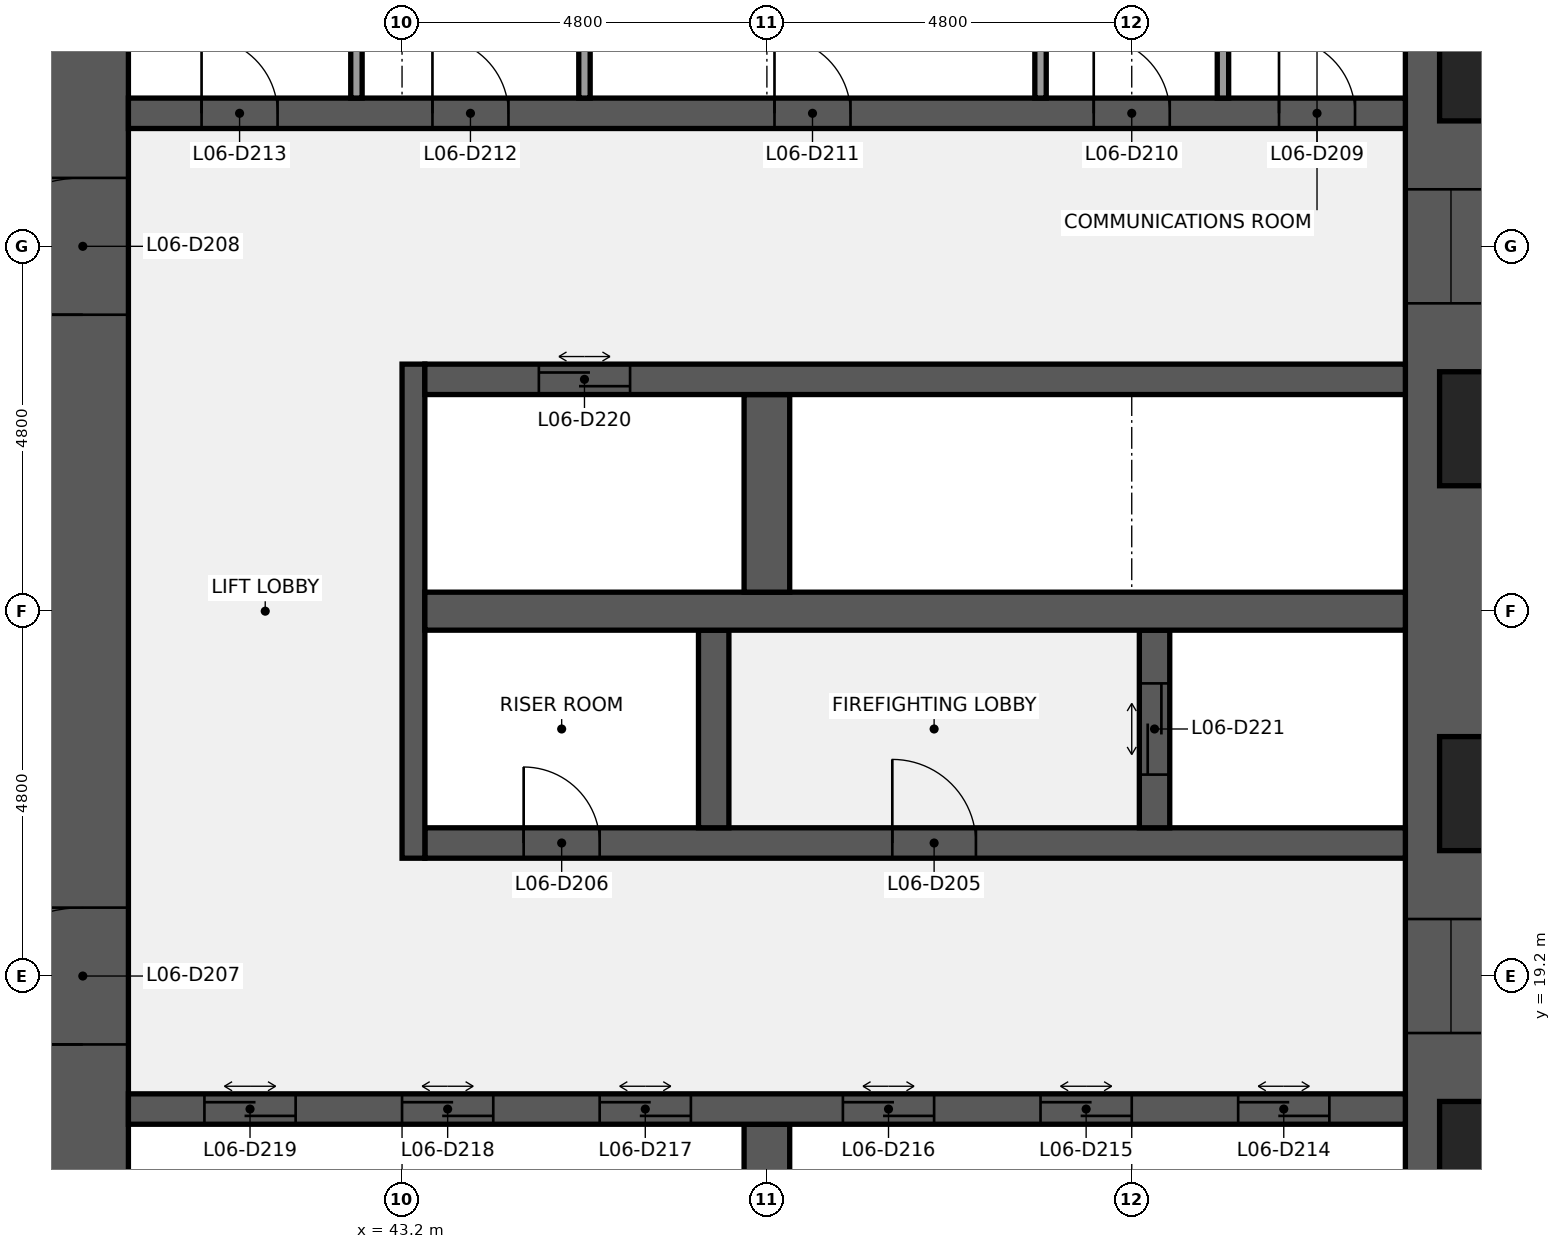
"""IFC4 building model, lengths in metres.
Left out: names, types, materials, properties, quantities, classifications, styles, units other than length and angle.
Written with IfcOpenShell. Run it as: python <this file> out.ifc"""

import sys

from ifc_helpers import new_model, si_unit, direction, frame, frame_2d, origin, place, context, subcontext, project, spatial, rectangle, extrude, element, fill, save


model = new_model("IFC4")
c1 = context("Model", 3, precision=1e-05, world=origin(), true_north=direction((0.0, 1.0)))
c2 = subcontext(c1, "Body", "Model", "MODEL_VIEW")
j1 = project(units=[si_unit("LENGTHUNIT", "METRE"), si_unit("PLANEANGLEUNIT", "RADIAN")], contexts=[c1])
p1 = place(None, origin())
s1 = spatial("IfcSite", under=j1, at=p1, CompositionType="ELEMENT")
p2 = place(p1, origin())
s2 = spatial("IfcBuilding", under=s1, at=p2, CompositionType="ELEMENT")
p3 = place(p2, frame((0.0, 0.0, 34.6)))
s3 = spatial("IfcBuildingStorey", under=s2, at=p3, CompositionType="ELEMENT", Elevation=34.6)
p4 = place(p3, frame((57.0, 38.4, 0.0), z_axis=(0.0, 0.0, 1.0), x_axis=(0.0, -1.0, 0.0)))
e1 = element("IfcWall", 1, at=p4, inside=s3, PredefinedType="SHEAR", context=c2, shape_type="SweptSolid", body=[
    extrude(rectangle(XDim=28.8, YDim=1.2, at=frame_2d((14.4, 0.0))), origin(), (0.0, 0.0, 1.0), 4.24),
])
p5 = place(p4, frame((18.45, 0.0, 0.9)))
e2 = element("IfcOpeningElement", 2, at=p5, cuts=e1, PredefinedType="OPENING", context=c2, shape_type="SweptSolid", body=[
    extrude(rectangle(XDim=1.5, YDim=1.5, at=frame_2d((0.75, 0.75))), frame((0.0, 0.61, 0.0), z_axis=(0.0, -1.0, 0.0), x_axis=(1.0, 0.0, 0.0)), (0.0, 0.0, 1.0), 1.22),
])
p6 = place(p4, frame((8.85, 0.0, 0.9)))
e3 = element("IfcOpeningElement", 3, at=p6, cuts=e1, PredefinedType="OPENING", context=c2, shape_type="SweptSolid", body=[
    extrude(rectangle(XDim=1.5, YDim=1.5, at=frame_2d((0.75, 0.75))), frame((0.0, 0.61, 0.0), z_axis=(0.0, -1.0, 0.0), x_axis=(1.0, 0.0, 0.0)), (0.0, 0.0, 1.0), 1.22),
])
p7 = place(p3, frame((39.0, 9.6, 0.0), z_axis=(0.0, 0.0, 1.0), x_axis=(0.0, 1.0, 0.0)))
e4 = element("IfcWall", 4, at=p7, inside=s3, PredefinedType="SHEAR", context=c2, shape_type="SweptSolid", body=[
    extrude(rectangle(XDim=28.8, YDim=1.2, at=frame_2d((14.4, 0.0))), origin(), (0.0, 0.0, 1.0), 4.24),
])
p8 = place(p7, frame((8.7, 0.0, 0.0)))
e5 = element("IfcOpeningElement", 5, at=p8, cuts=e4, PredefinedType="OPENING", context=c2, shape_type="SweptSolid", body=[
    extrude(rectangle(XDim=1.8, YDim=2.1, at=frame_2d((0.9, 1.05))), frame((0.0, 0.61, 0.0), z_axis=(0.0, -1.0, 0.0), x_axis=(1.0, 0.0, 0.0)), (0.0, 0.0, 1.0), 1.22),
])
p9 = place(p7, frame((18.3, 0.0, 0.0)))
e6 = element("IfcOpeningElement", 6, at=p9, cuts=e4, PredefinedType="OPENING", context=c2, shape_type="SweptSolid", body=[
    extrude(rectangle(XDim=1.8, YDim=2.1, at=frame_2d((0.9, 1.05))), frame((0.0, 0.61, 0.0), z_axis=(0.0, -1.0, 0.0), x_axis=(1.0, 0.0, 0.0)), (0.0, 0.0, 1.0), 1.22),
])
p10 = place(p3, frame((48.0, 14.65, 0.0), z_axis=(0.0, 0.0, 1.0), x_axis=(0.0, 1.0, 0.0)))
e7 = element("IfcWall", 7, at=p10, inside=s3, PredefinedType="SHEAR", context=c2, shape_type="SweptSolid", body=[
    extrude(rectangle(XDim=2.6, YDim=0.6, at=frame_2d((1.3, 0.0))), origin(), (0.0, 0.0, 1.0), 4.24),
])
p11 = place(p3, frame((39.6, 17.45, 0.0), z_axis=(0.0, 0.0, 1.0), x_axis=(1.0, 0.0, 0.0)))
e8 = element("IfcWall", 8, at=p11, inside=s3, PredefinedType="SHEAR", context=c2, shape_type="SweptSolid", body=[
    extrude(rectangle(XDim=16.8, YDim=0.4, at=frame_2d((8.4, 0.0))), origin(), (0.0, 0.0, 1.0), 4.24),
])
p12 = place(p11, frame((14.6, 0.0, 0.0)))
e9 = element("IfcOpeningElement", 9, at=p12, cuts=e8, PredefinedType="OPENING", context=c2, shape_type="SweptSolid", body=[
    extrude(rectangle(XDim=1.2, YDim=2.1, at=frame_2d((0.6, 1.05))), frame((0.0, 0.21, 0.0), z_axis=(0.0, -1.0, 0.0), x_axis=(1.0, 0.0, 0.0)), (0.0, 0.0, 1.0), 0.42),
])
p13 = place(p11, frame((12.0, 0.0, 0.0)))
e10 = element("IfcOpeningElement", 10, at=p13, cuts=e8, PredefinedType="OPENING", context=c2, shape_type="SweptSolid", body=[
    extrude(rectangle(XDim=1.2, YDim=2.1, at=frame_2d((0.6, 1.05))), frame((0.0, 0.21, 0.0), z_axis=(0.0, -1.0, 0.0), x_axis=(1.0, 0.0, 0.0)), (0.0, 0.0, 1.0), 0.42),
])
p14 = place(p11, frame((9.4, 0.0, 0.0)))
e11 = element("IfcOpeningElement", 11, at=p14, cuts=e8, PredefinedType="OPENING", context=c2, shape_type="SweptSolid", body=[
    extrude(rectangle(XDim=1.2, YDim=2.1, at=frame_2d((0.6, 1.05))), frame((0.0, 0.21, 0.0), z_axis=(0.0, -1.0, 0.0), x_axis=(1.0, 0.0, 0.0)), (0.0, 0.0, 1.0), 0.42),
])
p15 = place(p11, frame((6.2, 0.0, 0.0)))
e12 = element("IfcOpeningElement", 12, at=p15, cuts=e8, PredefinedType="OPENING", context=c2, shape_type="SweptSolid", body=[
    extrude(rectangle(XDim=1.2, YDim=2.1, at=frame_2d((0.6, 1.05))), frame((0.0, 0.21, 0.0), z_axis=(0.0, -1.0, 0.0), x_axis=(1.0, 0.0, 0.0)), (0.0, 0.0, 1.0), 0.42),
])
p16 = place(p11, frame((3.6, 0.0, 0.0)))
e13 = element("IfcOpeningElement", 13, at=p16, cuts=e8, PredefinedType="OPENING", context=c2, shape_type="SweptSolid", body=[
    extrude(rectangle(XDim=1.2, YDim=2.1, at=frame_2d((0.6, 1.05))), frame((0.0, 0.21, 0.0), z_axis=(0.0, -1.0, 0.0), x_axis=(1.0, 0.0, 0.0)), (0.0, 0.0, 1.0), 0.42),
])
p17 = place(p11, frame((1.0, 0.0, 0.0)))
e14 = element("IfcOpeningElement", 14, at=p17, cuts=e8, PredefinedType="OPENING", context=c2, shape_type="SweptSolid", body=[
    extrude(rectangle(XDim=1.2, YDim=2.1, at=frame_2d((0.6, 1.05))), frame((0.0, 0.21, 0.0), z_axis=(0.0, -1.0, 0.0), x_axis=(1.0, 0.0, 0.0)), (0.0, 0.0, 1.0), 0.42),
])
p18 = place(p3, frame((43.5, 20.95, 0.0), z_axis=(0.0, 0.0, 1.0), x_axis=(1.0, 0.0, 0.0)))
e15 = element("IfcWall", 15, at=p18, inside=s3, PredefinedType="SHEAR", context=c2, shape_type="SweptSolid", body=[
    extrude(rectangle(XDim=12.9, YDim=0.4, at=frame_2d((6.45, 0.0))), origin(), (0.0, 0.0, 1.0), 4.24),
])
p19 = place(p18, frame((6.15, 0.0, 0.0)))
e16 = element("IfcOpeningElement", 16, at=p19, cuts=e15, PredefinedType="OPENING", context=c2, shape_type="SweptSolid", body=[
    extrude(rectangle(XDim=1.1, YDim=2.1, at=frame_2d((0.55, 1.05))), frame((0.0, 0.21, 0.0), z_axis=(0.0, -1.0, 0.0), x_axis=(1.0, 0.0, 0.0)), (0.0, 0.0, 1.0), 0.42),
])
p20 = place(p18, frame((1.3, 0.0, 0.0)))
e17 = element("IfcOpeningElement", 17, at=p20, cuts=e15, PredefinedType="OPENING", context=c2, shape_type="SweptSolid", body=[
    extrude(rectangle(XDim=1.0, YDim=2.1, at=frame_2d((0.5, 1.05))), frame((0.0, 0.21, 0.0), z_axis=(0.0, -1.0, 0.0), x_axis=(1.0, 0.0, 0.0)), (0.0, 0.0, 1.0), 0.42),
])
p21 = place(p3, frame((43.35, 20.75, 0.0), z_axis=(0.0, 0.0, 1.0), x_axis=(0.0, 1.0, 0.0)))
e18 = element("IfcWall", 18, at=p21, inside=s3, PredefinedType="SHEAR", context=c2, shape_type="SweptSolid", body=[
    extrude(rectangle(XDim=6.5, YDim=0.3, at=frame_2d((3.25, 0.0))), origin(), (0.0, 0.0, 1.0), 4.24),
])
p22 = place(p3, frame((53.1, 21.15, 0.0), z_axis=(0.0, 0.0, 1.0), x_axis=(0.0, 1.0, 0.0)))
e19 = element("IfcWall", 19, at=p22, inside=s3, PredefinedType="SHEAR", context=c2, shape_type="SweptSolid", body=[
    extrude(rectangle(XDim=2.6, YDim=0.4, at=frame_2d((1.3, 0.0))), origin(), (0.0, 0.0, 1.0), 4.24),
])
p23 = place(p22, frame((0.7, 0.0, 0.0)))
e20 = element("IfcOpeningElement", 20, at=p23, cuts=e19, PredefinedType="OPENING", context=c2, shape_type="SweptSolid", body=[
    extrude(rectangle(XDim=1.2, YDim=2.1, at=frame_2d((0.6, 1.05))), frame((0.0, 0.21, 0.0), z_axis=(0.0, -1.0, 0.0), x_axis=(1.0, 0.0, 0.0)), (0.0, 0.0, 1.0), 0.42),
])
p24 = place(p3, frame((47.3, 21.15, 0.0), z_axis=(0.0, 0.0, 1.0), x_axis=(0.0, 1.0, 0.0)))
e21 = element("IfcWall", 21, at=p24, inside=s3, PredefinedType="SHEAR", context=c2, shape_type="SweptSolid", body=[
    extrude(rectangle(XDim=2.6, YDim=0.4, at=frame_2d((1.3, 0.0))), origin(), (0.0, 0.0, 1.0), 4.24),
])
p25 = place(p3, frame((43.5, 24.0, 0.0), z_axis=(0.0, 0.0, 1.0), x_axis=(1.0, 0.0, 0.0)))
e22 = element("IfcWall", 22, at=p25, inside=s3, PredefinedType="SHEAR", context=c2, shape_type="SweptSolid", body=[
    extrude(rectangle(XDim=12.9, YDim=0.5, at=frame_2d((6.45, 0.0))), origin(), (0.0, 0.0, 1.0), 4.24),
])
p26 = place(p3, frame((48.0, 24.25, 0.0), z_axis=(0.0, 0.0, 1.0), x_axis=(0.0, 1.0, 0.0)))
e23 = element("IfcWall", 23, at=p26, inside=s3, PredefinedType="SHEAR", context=c2, shape_type="SweptSolid", body=[
    extrude(rectangle(XDim=2.6, YDim=0.6, at=frame_2d((1.3, 0.0))), origin(), (0.0, 0.0, 1.0), 4.24),
])
p27 = place(p3, frame((43.5, 27.05, 0.0), z_axis=(0.0, 0.0, 1.0), x_axis=(1.0, 0.0, 0.0)))
e24 = element("IfcWall", 24, at=p27, inside=s3, PredefinedType="SHEAR", context=c2, shape_type="SweptSolid", body=[
    extrude(rectangle(XDim=12.9, YDim=0.4, at=frame_2d((6.45, 0.0))), origin(), (0.0, 0.0, 1.0), 4.24),
])
p28 = place(p27, frame((1.5, 0.0, 0.0)))
e25 = element("IfcOpeningElement", 25, at=p28, cuts=e24, PredefinedType="OPENING", context=c2, shape_type="SweptSolid", body=[
    extrude(rectangle(XDim=1.2, YDim=2.1, at=frame_2d((0.6, 1.05))), frame((0.0, 0.21, 0.0), z_axis=(0.0, -1.0, 0.0), x_axis=(1.0, 0.0, 0.0)), (0.0, 0.0, 1.0), 0.42),
])
p29 = place(p3, frame((39.6, 30.55, 0.0), z_axis=(0.0, 0.0, 1.0), x_axis=(1.0, 0.0, 0.0)))
e26 = element("IfcWall", 26, at=p29, inside=s3, PredefinedType="SHEAR", context=c2, shape_type="SweptSolid", body=[
    extrude(rectangle(XDim=16.8, YDim=0.4, at=frame_2d((8.4, 0.0))), origin(), (0.0, 0.0, 1.0), 4.24),
])
p30 = place(p29, frame((15.137, 0.0, 0.0)))
e27 = element("IfcOpeningElement", 27, at=p30, cuts=e26, PredefinedType="OPENING", context=c2, shape_type="SweptSolid", body=[
    extrude(rectangle(XDim=1.0, YDim=2.1, at=frame_2d((0.5, 1.05))), frame((0.0, 0.21, 0.0), z_axis=(0.0, -1.0, 0.0), x_axis=(1.0, 0.0, 0.0)), (0.0, 0.0, 1.0), 0.42),
])
p31 = place(p29, frame((12.7, 0.0, 0.0)))
e28 = element("IfcOpeningElement", 28, at=p31, cuts=e26, PredefinedType="OPENING", context=c2, shape_type="SweptSolid", body=[
    extrude(rectangle(XDim=1.0, YDim=2.1, at=frame_2d((0.5, 1.05))), frame((0.0, 0.21, 0.0), z_axis=(0.0, -1.0, 0.0), x_axis=(1.0, 0.0, 0.0)), (0.0, 0.0, 1.0), 0.42),
])
p32 = place(p29, frame((8.5, 0.0, 0.0)))
e29 = element("IfcOpeningElement", 29, at=p32, cuts=e26, PredefinedType="OPENING", context=c2, shape_type="SweptSolid", body=[
    extrude(rectangle(XDim=1.0, YDim=2.1, at=frame_2d((0.5, 1.05))), frame((0.0, 0.21, 0.0), z_axis=(0.0, -1.0, 0.0), x_axis=(1.0, 0.0, 0.0)), (0.0, 0.0, 1.0), 0.42),
])
p33 = place(p29, frame((4.0, 0.0, 0.0)))
e30 = element("IfcOpeningElement", 30, at=p33, cuts=e26, PredefinedType="OPENING", context=c2, shape_type="SweptSolid", body=[
    extrude(rectangle(XDim=1.0, YDim=2.1, at=frame_2d((0.5, 1.05))), frame((0.0, 0.21, 0.0), z_axis=(0.0, -1.0, 0.0), x_axis=(1.0, 0.0, 0.0)), (0.0, 0.0, 1.0), 0.42),
])
p34 = place(p29, frame((0.962, 0.0, 0.0)))
e31 = element("IfcOpeningElement", 31, at=p34, cuts=e26, PredefinedType="OPENING", context=c2, shape_type="SweptSolid", body=[
    extrude(rectangle(XDim=1.0, YDim=2.1, at=frame_2d((0.5, 1.05))), frame((0.0, 0.21, 0.0), z_axis=(0.0, -1.0, 0.0), x_axis=(1.0, 0.0, 0.0)), (0.0, 0.0, 1.0), 0.42),
])
for number, where, z_axis, x_axis in (
    (32, (54.0, 30.75, 0.0), (0.0, 0.0, 1.0), (0.0, 1.0, 0.0)),
    (33, (51.6, 30.75, 0.0), (0.0, 0.0, 1.0), (0.0, 1.0, 0.0)),
    (34, (45.6, 30.75, 0.0), (0.0, 0.0, 1.0), (0.0, 1.0, 0.0)),
    (35, (42.6, 30.75, 0.0), (0.0, 0.0, 1.0), (0.0, 1.0, 0.0)),
):
    element("IfcWall", number, at=place(p3, frame(where, z_axis=z_axis, x_axis=x_axis)), inside=s3, PredefinedType="PARTITIONING", context=c2, shape_type="SweptSolid", body=[
        extrude(rectangle(XDim=2.6, YDim=0.15, at=frame_2d((1.3, 0.0))), origin(), (0.0, 0.0, 1.0), 4.24),
    ])
p35 = place(p19, origin())
e36 = element("IfcDoor", 36, at=p35, inside=s3, OperationType="SINGLE_SWING_LEFT", PredefinedType="DOOR", context=c2, shape_type="SweptSolid", body=[
    extrude(rectangle(XDim=1.1, YDim=2.1, at=frame_2d((0.55, 1.05))), frame((0.0, 0.025, 0.0), z_axis=(0.0, -1.0, 0.0), x_axis=(1.0, 0.0, 0.0)), (0.0, 0.0, 1.0), 0.05),
])
fill(e16, e36)
p36 = place(p20, origin())
e37 = element("IfcDoor", 37, at=p36, inside=s3, OperationType="SINGLE_SWING_LEFT", PredefinedType="DOOR", context=c2, shape_type="SweptSolid", body=[
    extrude(rectangle(XDim=1.0, YDim=2.1, at=frame_2d((0.5, 1.05))), frame((0.0, 0.025, 0.0), z_axis=(0.0, -1.0, 0.0), x_axis=(1.0, 0.0, 0.0)), (0.0, 0.0, 1.0), 0.05),
])
fill(e17, e37)
p37 = place(p8, origin())
e38 = element("IfcDoor", 38, at=p37, inside=s3, OperationType="DOUBLE_DOOR_SINGLE_SWING", PredefinedType="DOOR", context=c2, shape_type="SweptSolid", body=[
    extrude(rectangle(XDim=1.8, YDim=2.1, at=frame_2d((0.9, 1.05))), frame((0.0, 0.025, 0.0), z_axis=(0.0, -1.0, 0.0), x_axis=(1.0, 0.0, 0.0)), (0.0, 0.0, 1.0), 0.05),
])
fill(e5, e38)
p38 = place(p9, origin())
e39 = element("IfcDoor", 39, at=p38, inside=s3, OperationType="DOUBLE_DOOR_SINGLE_SWING", PredefinedType="DOOR", context=c2, shape_type="SweptSolid", body=[
    extrude(rectangle(XDim=1.8, YDim=2.1, at=frame_2d((0.9, 1.05))), frame((0.0, 0.025, 0.0), z_axis=(0.0, -1.0, 0.0), x_axis=(1.0, 0.0, 0.0)), (0.0, 0.0, 1.0), 0.05),
])
fill(e6, e39)
p39 = place(p30, origin())
e40 = element("IfcDoor", 40, at=p39, inside=s3, OperationType="SINGLE_SWING_LEFT", PredefinedType="DOOR", context=c2, shape_type="SweptSolid", body=[
    extrude(rectangle(XDim=1.0, YDim=2.1, at=frame_2d((0.5, 1.05))), frame((0.0, 0.025, 0.0), z_axis=(0.0, -1.0, 0.0), x_axis=(1.0, 0.0, 0.0)), (0.0, 0.0, 1.0), 0.05),
])
fill(e27, e40)
p40 = place(p31, origin())
e41 = element("IfcDoor", 41, at=p40, inside=s3, OperationType="SINGLE_SWING_LEFT", PredefinedType="DOOR", context=c2, shape_type="SweptSolid", body=[
    extrude(rectangle(XDim=1.0, YDim=2.1, at=frame_2d((0.5, 1.05))), frame((0.0, 0.025, 0.0), z_axis=(0.0, -1.0, 0.0), x_axis=(1.0, 0.0, 0.0)), (0.0, 0.0, 1.0), 0.05),
])
fill(e28, e41)
p41 = place(p32, origin())
e42 = element("IfcDoor", 42, at=p41, inside=s3, OperationType="SINGLE_SWING_LEFT", PredefinedType="DOOR", context=c2, shape_type="SweptSolid", body=[
    extrude(rectangle(XDim=1.0, YDim=2.1, at=frame_2d((0.5, 1.05))), frame((0.0, 0.025, 0.0), z_axis=(0.0, -1.0, 0.0), x_axis=(1.0, 0.0, 0.0)), (0.0, 0.0, 1.0), 0.05),
])
fill(e29, e42)
p42 = place(p33, origin())
e43 = element("IfcDoor", 43, at=p42, inside=s3, OperationType="SINGLE_SWING_LEFT", PredefinedType="DOOR", context=c2, shape_type="SweptSolid", body=[
    extrude(rectangle(XDim=1.0, YDim=2.1, at=frame_2d((0.5, 1.05))), frame((0.0, 0.025, 0.0), z_axis=(0.0, -1.0, 0.0), x_axis=(1.0, 0.0, 0.0)), (0.0, 0.0, 1.0), 0.05),
])
fill(e30, e43)
p43 = place(p34, origin())
e44 = element("IfcDoor", 44, at=p43, inside=s3, OperationType="SINGLE_SWING_LEFT", PredefinedType="DOOR", context=c2, shape_type="SweptSolid", body=[
    extrude(rectangle(XDim=1.0, YDim=2.1, at=frame_2d((0.5, 1.05))), frame((0.0, 0.025, 0.0), z_axis=(0.0, -1.0, 0.0), x_axis=(1.0, 0.0, 0.0)), (0.0, 0.0, 1.0), 0.05),
])
fill(e31, e44)
p44 = place(p12, origin())
e45 = element("IfcDoor", 45, at=p44, inside=s3, OperationType="DOUBLE_DOOR_SLIDING", PredefinedType="DOOR", context=c2, shape_type="SweptSolid", body=[
    extrude(rectangle(XDim=1.2, YDim=2.1, at=frame_2d((0.6, 1.05))), frame((0.0, 0.025, 0.0), z_axis=(0.0, -1.0, 0.0), x_axis=(1.0, 0.0, 0.0)), (0.0, 0.0, 1.0), 0.05),
])
fill(e9, e45)
p45 = place(p13, origin())
e46 = element("IfcDoor", 46, at=p45, inside=s3, OperationType="DOUBLE_DOOR_SLIDING", PredefinedType="DOOR", context=c2, shape_type="SweptSolid", body=[
    extrude(rectangle(XDim=1.2, YDim=2.1, at=frame_2d((0.6, 1.05))), frame((0.0, 0.025, 0.0), z_axis=(0.0, -1.0, 0.0), x_axis=(1.0, 0.0, 0.0)), (0.0, 0.0, 1.0), 0.05),
])
fill(e10, e46)
p46 = place(p14, origin())
e47 = element("IfcDoor", 47, at=p46, inside=s3, OperationType="DOUBLE_DOOR_SLIDING", PredefinedType="DOOR", context=c2, shape_type="SweptSolid", body=[
    extrude(rectangle(XDim=1.2, YDim=2.1, at=frame_2d((0.6, 1.05))), frame((0.0, 0.025, 0.0), z_axis=(0.0, -1.0, 0.0), x_axis=(1.0, 0.0, 0.0)), (0.0, 0.0, 1.0), 0.05),
])
fill(e11, e47)
p47 = place(p15, origin())
e48 = element("IfcDoor", 48, at=p47, inside=s3, OperationType="DOUBLE_DOOR_SLIDING", PredefinedType="DOOR", context=c2, shape_type="SweptSolid", body=[
    extrude(rectangle(XDim=1.2, YDim=2.1, at=frame_2d((0.6, 1.05))), frame((0.0, 0.025, 0.0), z_axis=(0.0, -1.0, 0.0), x_axis=(1.0, 0.0, 0.0)), (0.0, 0.0, 1.0), 0.05),
])
fill(e12, e48)
p48 = place(p16, origin())
e49 = element("IfcDoor", 49, at=p48, inside=s3, OperationType="DOUBLE_DOOR_SLIDING", PredefinedType="DOOR", context=c2, shape_type="SweptSolid", body=[
    extrude(rectangle(XDim=1.2, YDim=2.1, at=frame_2d((0.6, 1.05))), frame((0.0, 0.025, 0.0), z_axis=(0.0, -1.0, 0.0), x_axis=(1.0, 0.0, 0.0)), (0.0, 0.0, 1.0), 0.05),
])
fill(e13, e49)
p49 = place(p17, origin())
e50 = element("IfcDoor", 50, at=p49, inside=s3, OperationType="DOUBLE_DOOR_SLIDING", PredefinedType="DOOR", context=c2, shape_type="SweptSolid", body=[
    extrude(rectangle(XDim=1.2, YDim=2.1, at=frame_2d((0.6, 1.05))), frame((0.0, 0.025, 0.0), z_axis=(0.0, -1.0, 0.0), x_axis=(1.0, 0.0, 0.0)), (0.0, 0.0, 1.0), 0.05),
])
fill(e14, e50)
p50 = place(p28, origin())
e51 = element("IfcDoor", 51, at=p50, inside=s3, OperationType="DOUBLE_DOOR_SLIDING", PredefinedType="DOOR", context=c2, shape_type="SweptSolid", body=[
    extrude(rectangle(XDim=1.2, YDim=2.1, at=frame_2d((0.6, 1.05))), frame((0.0, 0.025, 0.0), z_axis=(0.0, -1.0, 0.0), x_axis=(1.0, 0.0, 0.0)), (0.0, 0.0, 1.0), 0.05),
])
fill(e25, e51)
p51 = place(p23, origin())
e52 = element("IfcDoor", 52, at=p51, inside=s3, OperationType="DOUBLE_DOOR_SLIDING", PredefinedType="DOOR", context=c2, shape_type="SweptSolid", body=[
    extrude(rectangle(XDim=1.2, YDim=2.1, at=frame_2d((0.6, 1.05))), frame((0.0, 0.025, 0.0), z_axis=(0.0, -1.0, 0.0), x_axis=(1.0, 0.0, 0.0)), (0.0, 0.0, 1.0), 0.05),
])
fill(e20, e52)
p52 = place(p5, origin())
e53 = element("IfcWindow", 53, at=p52, inside=s3, PartitioningType="SINGLE_PANEL", PredefinedType="WINDOW", context=c2, shape_type="SweptSolid", body=[
    extrude(rectangle(XDim=1.5, YDim=1.5, at=frame_2d((0.75, 0.75))), frame((0.0, 0.03, 0.0), z_axis=(0.0, -1.0, 0.0), x_axis=(1.0, 0.0, 0.0)), (0.0, 0.0, 1.0), 0.06),
])
fill(e2, e53)
p53 = place(p6, origin())
e54 = element("IfcWindow", 54, at=p53, inside=s3, PartitioningType="SINGLE_PANEL", PredefinedType="WINDOW", context=c2, shape_type="SweptSolid", body=[
    extrude(rectangle(XDim=1.5, YDim=1.5, at=frame_2d((0.75, 0.75))), frame((0.0, 0.03, 0.0), z_axis=(0.0, -1.0, 0.0), x_axis=(1.0, 0.0, 0.0)), (0.0, 0.0, 1.0), 0.06),
])
fill(e3, e54)
save(model, sys.argv[1])
